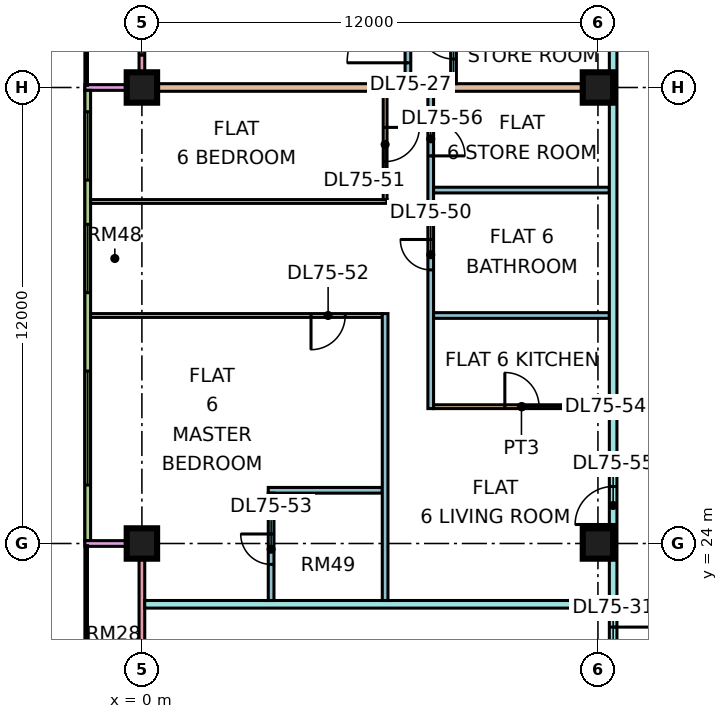
"""IFC4 building model, lengths in metres.
Left out: names, types, materials, properties, quantities, classifications, styles, units other than length and angle.
Written with IfcOpenShell. Run it as: python <this file> out.ifc"""

import sys

from ifc_helpers import new_model, si_unit, direction, frame, frame_2d, origin, origin_2d, place, context, subcontext, project, spatial, rectangle, extrude, element, fill, save


model = new_model("IFC4")
c1 = context("Model", 3, precision=1e-05, world=origin(), true_north=direction((0.0, 1.0)))
c2 = subcontext(c1, "Body", "Model", "MODEL_VIEW")
j1 = project(units=[si_unit("LENGTHUNIT", "METRE"), si_unit("PLANEANGLEUNIT", "RADIAN")], contexts=[c1])
p1 = place(None, origin())
s1 = spatial("IfcSite", under=j1, at=p1, CompositionType="ELEMENT")
p2 = place(p1, origin())
s2 = spatial("IfcBuilding", under=s1, at=p2, CompositionType="ELEMENT")
p3 = place(p2, frame((0.0, 0.0, 318.4)))
s3 = spatial("IfcBuildingStorey", under=s2, at=p3, CompositionType="ELEMENT", Elevation=318.4)
p4 = place(p3, frame((0.0, 24.0, 0.0), z_axis=(0.0, 0.0, 1.0), x_axis=(1.0, 0.0, 0.0)))
e1 = element("IfcColumn", 1, at=p4, inside=s3, PredefinedType="COLUMN", context=c2, shape_type="SweptSolid", body=[
    extrude(rectangle(XDim=0.8, YDim=0.8, at=origin_2d()), origin(), (0.0, 0.0, 1.0), 3.75),
])
p5 = place(p3, frame((0.0, 36.0, 0.0), z_axis=(0.0, 0.0, 1.0), x_axis=(1.0, 0.0, 0.0)))
e2 = element("IfcColumn", 2, at=p5, inside=s3, PredefinedType="COLUMN", context=c2, shape_type="SweptSolid", body=[
    extrude(rectangle(XDim=0.8, YDim=0.8, at=origin_2d()), origin(), (0.0, 0.0, 1.0), 3.75),
])
for number, where, z_axis, x_axis in (
    (3, (12.0, 24.0, 0.0), (0.0, 0.0, 1.0), (1.0, 0.0, 0.0)),
    (4, (12.0, 36.0, 0.0), (0.0, 0.0, 1.0), (1.0, 0.0, 0.0)),
):
    element("IfcColumn", number, at=place(p3, frame(where, z_axis=z_axis, x_axis=x_axis)), inside=s3, PredefinedType="COLUMN", context=c2, shape_type="SweptSolid", body=[
        extrude(rectangle(XDim=0.8, YDim=0.8, at=origin_2d()), origin(), (0.0, 0.0, 1.0), 3.75),
    ])
p6 = place(p3, frame((0.0, 47.925, 0.0), z_axis=(0.0, 0.0, 1.0), x_axis=(0.0, -1.0, 0.0)))
e5 = element("IfcWall", 5, at=p6, inside=s3, PredefinedType="SOLIDWALL", context=c2, shape_type="SweptSolid", body=[
    extrude(rectangle(XDim=11.85, YDim=0.15, at=frame_2d((5.925, 0.0))), origin(), (0.0, 0.0, 1.0), 3.3),
])
p7 = place(p6, frame((0.613, 0.0, 0.0)))
e6 = element("IfcOpeningElement", 6, at=p7, cuts=e5, PredefinedType="OPENING", context=c2, shape_type="SweptSolid", body=[
    extrude(rectangle(XDim=1.2, YDim=2.4, at=frame_2d((0.6, 1.2))), frame((0.0, 0.085, 0.0), z_axis=(0.0, -1.0, 0.0), x_axis=(1.0, 0.0, 0.0)), (0.0, 0.0, 1.0), 0.17),
])
p8 = place(p6, frame((4.675, 0.0, 0.45)))
e7 = element("IfcOpeningElement", 7, at=p8, cuts=e5, PredefinedType="OPENING", context=c2, shape_type="SweptSolid", body=[
    extrude(rectangle(XDim=3.0, YDim=2.4, at=frame_2d((1.5, 1.2))), frame((0.0, 0.085, 0.0), z_axis=(0.0, -1.0, 0.0), x_axis=(1.0, 0.0, 0.0)), (0.0, 0.0, 1.0), 0.17),
])
p9 = place(p6, frame((9.275, 0.0, 0.45)))
e8 = element("IfcOpeningElement", 8, at=p9, cuts=e5, PredefinedType="OPENING", context=c2, shape_type="SweptSolid", body=[
    extrude(rectangle(XDim=1.8, YDim=2.4, at=frame_2d((0.9, 1.2))), frame((0.0, 0.085, 0.0), z_axis=(0.0, -1.0, 0.0), x_axis=(1.0, 0.0, 0.0)), (0.0, 0.0, 1.0), 0.17),
])
p10 = place(p3, frame((-1.5, 36.0, 0.0), z_axis=(0.0, 0.0, 1.0), x_axis=(1.0, 0.0, 0.0)))
e9 = element("IfcWall", 9, at=p10, inside=s3, PredefinedType="SOLIDWALL", context=c2, shape_type="SweptSolid", body=[
    extrude(rectangle(XDim=1.5, YDim=0.15, at=frame_2d((0.75, 0.0))), origin(), (0.0, 0.0, 1.0), 3.3),
])
p11 = place(p3, frame((-1.425, 35.925, 0.0), z_axis=(0.0, 0.0, 1.0), x_axis=(0.0, -1.0, 0.0)))
e10 = element("IfcWall", 10, at=p11, inside=s3, PredefinedType="SOLIDWALL", context=c2, shape_type="SweptSolid", body=[
    extrude(rectangle(XDim=11.85, YDim=0.15, at=frame_2d((5.925, 0.0))), origin(), (0.0, 0.0, 1.0), 3.3),
])
p12 = place(p11, frame((0.562, 0.0, 0.45)))
e11 = element("IfcOpeningElement", 11, at=p12, cuts=e10, PredefinedType="OPENING", context=c2, shape_type="SweptSolid", body=[
    extrude(rectangle(XDim=1.8, YDim=2.4, at=frame_2d((0.9, 1.2))), frame((0.0, 0.085, 0.0), z_axis=(0.0, -1.0, 0.0), x_axis=(1.0, 0.0, 0.0)), (0.0, 0.0, 1.0), 0.17),
])
p13 = place(p11, frame((3.525, 0.0, 0.45)))
e12 = element("IfcOpeningElement", 12, at=p13, cuts=e10, PredefinedType="OPENING", context=c2, shape_type="SweptSolid", body=[
    extrude(rectangle(XDim=1.8, YDim=2.4, at=frame_2d((0.9, 1.2))), frame((0.0, 0.085, 0.0), z_axis=(0.0, -1.0, 0.0), x_axis=(1.0, 0.0, 0.0)), (0.0, 0.0, 1.0), 0.17),
])
p14 = place(p11, frame((7.387, 0.0, 0.45)))
e13 = element("IfcOpeningElement", 13, at=p14, cuts=e10, PredefinedType="OPENING", context=c2, shape_type="SweptSolid", body=[
    extrude(rectangle(XDim=3.0, YDim=2.4, at=frame_2d((1.5, 1.2))), frame((0.0, 0.085, 0.0), z_axis=(0.0, -1.0, 0.0), x_axis=(1.0, 0.0, 0.0)), (0.0, 0.0, 1.0), 0.17),
])
p15 = place(p3, frame((0.0, 23.925, 0.0), z_axis=(0.0, 0.0, 1.0), x_axis=(0.0, -1.0, 0.0)))
e14 = element("IfcWall", 14, at=p15, inside=s3, PredefinedType="SOLIDWALL", context=c2, shape_type="SweptSolid", body=[
    extrude(rectangle(XDim=11.35, YDim=0.15, at=frame_2d((5.675, 0.0))), origin(), (0.0, 0.0, 1.0), 3.3),
])
p16 = place(p15, frame((6.738, 0.0, 0.0)))
e15 = element("IfcOpeningElement", 15, at=p16, cuts=e14, PredefinedType="OPENING", context=c2, shape_type="SweptSolid", body=[
    extrude(rectangle(XDim=1.8, YDim=2.4, at=frame_2d((0.9, 1.2))), frame((0.0, 0.085, 0.0), z_axis=(0.0, -1.0, 0.0), x_axis=(1.0, 0.0, 0.0)), (0.0, 0.0, 1.0), 0.17),
])
p17 = place(p3, frame((-1.5, 24.0, 0.0), z_axis=(0.0, 0.0, 1.0), x_axis=(1.0, 0.0, 0.0)))
e16 = element("IfcWall", 16, at=p17, inside=s3, PredefinedType="SOLIDWALL", context=c2, shape_type="SweptSolid", body=[
    extrude(rectangle(XDim=1.5, YDim=0.15, at=frame_2d((0.75, 0.0))), origin(), (0.0, 0.0, 1.0), 3.3),
])
p18 = place(p3, frame((-1.35, 30.0, 0.0), z_axis=(0.0, 0.0, 1.0), x_axis=(1.0, 0.0, 0.0)))
e17 = element("IfcWall", 17, at=p18, inside=s3, PredefinedType="PARTITIONING", context=c2, shape_type="SweptSolid", body=[
    extrude(rectangle(XDim=7.675, YDim=0.1, at=frame_2d((3.837, 0.0))), origin(), (0.0, 0.0, 1.0), 3.3),
])
p19 = place(p18, frame((5.8, 0.0, 0.0)))
e18 = element("IfcOpeningElement", 18, at=p19, cuts=e17, PredefinedType="OPENING", context=c2, shape_type="SweptSolid", body=[
    extrude(rectangle(XDim=0.9, YDim=2.1, at=frame_2d((0.45, 1.05))), frame((0.0, 0.06, 0.0), z_axis=(0.0, -1.0, 0.0), x_axis=(1.0, 0.0, 0.0)), (0.0, 0.0, 1.0), 0.12),
])
p20 = place(p3, frame((-1.35, 33.0, 0.0), z_axis=(0.0, 0.0, 1.0), x_axis=(1.0, 0.0, 0.0)))
e19 = element("IfcWall", 19, at=p20, inside=s3, PredefinedType="PARTITIONING", context=c2, shape_type="SweptSolid", body=[
    extrude(rectangle(XDim=7.8, YDim=0.1, at=frame_2d((3.9, 0.0))), origin(), (0.0, 0.0, 1.0), 3.3),
])
e20 = element("IfcWall", 20, at=p5, inside=s3, PredefinedType="PARTITIONING", context=c2, shape_type="SweptSolid", body=[
    extrude(rectangle(XDim=12.3, YDim=0.2, at=frame_2d((6.15, 0.0))), origin(), (0.0, 0.0, 1.0), 3.3),
])
p21 = place(p3, frame((0.074, 22.4, 0.0), z_axis=(0.0, 0.0, 1.0), x_axis=(1.0, 0.0, 0.0)))
e21 = element("IfcWall", 21, at=p21, inside=s3, PredefinedType="PARTITIONING", context=c2, shape_type="SweptSolid", body=[
    extrude(rectangle(XDim=12.226, YDim=0.2, at=frame_2d((6.113, 0.0))), origin(), (0.0, 0.0, 1.0), 3.3),
])
p22 = place(p3, frame((3.325, 25.4, 0.0), z_axis=(0.0, 0.0, 1.0), x_axis=(1.0, 0.0, 0.0)))
e22 = element("IfcWall", 22, at=p22, inside=s3, PredefinedType="PARTITIONING", context=c2, shape_type="SweptSolid", body=[
    extrude(rectangle(XDim=3.0, YDim=0.15, at=frame_2d((1.5, 0.0))), origin(), (0.0, 0.0, 1.0), 3.3),
])
p23 = place(p3, frame((3.4, 22.5, 0.0), z_axis=(0.0, 0.0, 1.0), x_axis=(0.0, 1.0, 0.0)))
e23 = element("IfcWall", 23, at=p23, inside=s3, PredefinedType="PARTITIONING", context=c2, shape_type="SweptSolid", body=[
    extrude(rectangle(XDim=2.825, YDim=0.15, at=frame_2d((1.413, 0.0))), origin(), (0.0, 0.0, 1.0), 3.3),
])
p24 = place(p23, frame((0.95, 0.0, 0.0)))
e24 = element("IfcOpeningElement", 24, at=p24, cuts=e23, PredefinedType="OPENING", context=c2, shape_type="SweptSolid", body=[
    extrude(rectangle(XDim=0.8, YDim=2.1, at=frame_2d((0.4, 1.05))), frame((0.0, 0.085, 0.0), z_axis=(0.0, -1.0, 0.0), x_axis=(1.0, 0.0, 0.0)), (0.0, 0.0, 1.0), 0.17),
])
p25 = place(p3, frame((6.4, 22.5, 0.0), z_axis=(0.0, 0.0, 1.0), x_axis=(0.0, 1.0, 0.0)))
e25 = element("IfcWall", 25, at=p25, inside=s3, PredefinedType="PARTITIONING", context=c2, shape_type="SweptSolid", body=[
    extrude(rectangle(XDim=7.55, YDim=0.15, at=frame_2d((3.775, 0.0))), origin(), (0.0, 0.0, 1.0), 3.3),
])
p26 = place(p3, frame((6.4, 33.05, 0.0), z_axis=(0.0, 0.0, 1.0), x_axis=(0.0, 1.0, 0.0)))
e26 = element("IfcWall", 26, at=p26, inside=s3, PredefinedType="PARTITIONING", context=c2, shape_type="SweptSolid", body=[
    extrude(rectangle(XDim=2.85, YDim=0.1, at=frame_2d((1.425, 0.0))), origin(), (0.0, 0.0, 1.0), 3.3),
])
p27 = place(p26, frame((1.0, 0.0, 0.0)))
e27 = element("IfcOpeningElement", 27, at=p27, cuts=e26, PredefinedType="OPENING", context=c2, shape_type="SweptSolid", body=[
    extrude(rectangle(XDim=0.9, YDim=2.1, at=frame_2d((0.45, 1.05))), frame((0.0, 0.06, 0.0), z_axis=(0.0, -1.0, 0.0), x_axis=(1.0, 0.0, 0.0)), (0.0, 0.0, 1.0), 0.12),
])
p28 = place(p3, frame((7.0, 36.1, 0.0), z_axis=(0.0, 0.0, 1.0), x_axis=(0.0, 1.0, 0.0)))
e28 = element("IfcWall", 28, at=p28, inside=s3, PredefinedType="PARTITIONING", context=c2, shape_type="SweptSolid", body=[
    extrude(rectangle(XDim=8.95, YDim=0.15, at=frame_2d((4.475, 0.0))), origin(), (0.0, 0.0, 1.0), 3.3),
])
p29 = place(p28, frame((6.95, 0.0, 0.0)))
e29 = element("IfcOpeningElement", 29, at=p29, cuts=e28, PredefinedType="OPENING", context=c2, shape_type="SweptSolid", body=[
    extrude(rectangle(XDim=0.9, YDim=2.1, at=frame_2d((0.45, 1.05))), frame((0.0, 0.085, 0.0), z_axis=(0.0, -1.0, 0.0), x_axis=(1.0, 0.0, 0.0)), (0.0, 0.0, 1.0), 0.17),
])
p30 = place(p28, frame((0.55, 0.0, 0.0)))
e30 = element("IfcOpeningElement", 30, at=p30, cuts=e28, PredefinedType="OPENING", context=c2, shape_type="SweptSolid", body=[
    extrude(rectangle(XDim=1.6, YDim=2.1, at=frame_2d((0.8, 1.05))), frame((0.0, 0.085, 0.0), z_axis=(0.0, -1.0, 0.0), x_axis=(1.0, 0.0, 0.0)), (0.0, 0.0, 1.0), 0.17),
])
p31 = place(p3, frame((7.6, 27.55, 0.0), z_axis=(0.0, 0.0, 1.0), x_axis=(0.0, 1.0, 0.0)))
e31 = element("IfcWall", 31, at=p31, inside=s3, PredefinedType="PARTITIONING", context=c2, shape_type="SweptSolid", body=[
    extrude(rectangle(XDim=8.35, YDim=0.15, at=frame_2d((4.175, 0.0))), origin(), (0.0, 0.0, 1.0), 3.3),
])
p32 = place(p31, frame((3.65, 0.0, 0.0)))
e32 = element("IfcOpeningElement", 32, at=p32, cuts=e31, PredefinedType="OPENING", context=c2, shape_type="SweptSolid", body=[
    extrude(rectangle(XDim=0.8, YDim=2.1, at=frame_2d((0.4, 1.05))), frame((0.0, 0.085, 0.0), z_axis=(0.0, -1.0, 0.0), x_axis=(1.0, 0.0, 0.0)), (0.0, 0.0, 1.0), 0.17),
])
p33 = place(p31, frame((6.65, 0.0, 0.0)))
e33 = element("IfcOpeningElement", 33, at=p33, cuts=e31, PredefinedType="OPENING", context=c2, shape_type="SweptSolid", body=[
    extrude(rectangle(XDim=0.9, YDim=2.1, at=frame_2d((0.45, 1.05))), frame((0.0, 0.085, 0.0), z_axis=(0.0, -1.0, 0.0), x_axis=(1.0, 0.0, 0.0)), (0.0, 0.0, 1.0), 0.17),
])
p34 = place(p3, frame((7.675, 27.6, 0.0), z_axis=(0.0, 0.0, 1.0), x_axis=(1.0, 0.0, 0.0)))
e34 = element("IfcWall", 34, at=p34, inside=s3, PredefinedType="PARTITIONING", context=c2, shape_type="SweptSolid", body=[
    extrude(rectangle(XDim=4.625, YDim=0.1, at=frame_2d((2.312, 0.0))), origin(), (0.0, 0.0, 1.0), 3.3),
])
p35 = place(p34, frame((1.875, 0.0, 0.0)))
e35 = element("IfcOpeningElement", 35, at=p35, cuts=e34, PredefinedType="OPENING", context=c2, shape_type="SweptSolid", body=[
    extrude(rectangle(XDim=0.9, YDim=2.1, at=frame_2d((0.45, 1.05))), frame((0.0, 0.06, 0.0), z_axis=(0.0, -1.0, 0.0), x_axis=(1.0, 0.0, 0.0)), (0.0, 0.0, 1.0), 0.12),
])
for number, where, z_axis, x_axis in (
    (36, (7.675, 30.0, 0.0), (0.0, 0.0, 1.0), (1.0, 0.0, 0.0)),
    (37, (7.675, 33.3, 0.0), (0.0, 0.0, 1.0), (1.0, 0.0, 0.0)),
):
    element("IfcWall", number, at=place(p3, frame(where, z_axis=z_axis, x_axis=x_axis)), inside=s3, PredefinedType="PARTITIONING", context=c2, shape_type="SweptSolid", body=[
        extrude(rectangle(XDim=4.625, YDim=0.15, at=frame_2d((2.312, 0.0))), origin(), (0.0, 0.0, 1.0), 3.3),
    ])
p36 = place(p3, frame((8.2, 36.1, 0.0), z_axis=(0.0, 0.0, 1.0), x_axis=(0.0, 1.0, 0.0)))
e38 = element("IfcWall", 38, at=p36, inside=s3, PredefinedType="PARTITIONING", context=c2, shape_type="SweptSolid", body=[
    extrude(rectangle(XDim=14.65, YDim=0.15, at=frame_2d((7.325, 0.0))), origin(), (0.0, 0.0, 1.0), 3.3),
])
p37 = place(p36, frame((9.65, 0.0, 0.0)))
e39 = element("IfcOpeningElement", 39, at=p37, cuts=e38, PredefinedType="OPENING", context=c2, shape_type="SweptSolid", body=[
    extrude(rectangle(XDim=0.8, YDim=2.1, at=frame_2d((0.4, 1.05))), frame((0.0, 0.085, 0.0), z_axis=(0.0, -1.0, 0.0), x_axis=(1.0, 0.0, 0.0)), (0.0, 0.0, 1.0), 0.17),
])
p38 = place(p36, frame((5.15, 0.0, 0.0)))
e40 = element("IfcOpeningElement", 40, at=p38, cuts=e38, PredefinedType="OPENING", context=c2, shape_type="SweptSolid", body=[
    extrude(rectangle(XDim=0.9, YDim=2.1, at=frame_2d((0.45, 1.05))), frame((0.0, 0.085, 0.0), z_axis=(0.0, -1.0, 0.0), x_axis=(1.0, 0.0, 0.0)), (0.0, 0.0, 1.0), 0.17),
])
p39 = place(p36, frame((0.65, 0.0, 0.0)))
e41 = element("IfcOpeningElement", 41, at=p39, cuts=e38, PredefinedType="OPENING", context=c2, shape_type="SweptSolid", body=[
    extrude(rectangle(XDim=0.9, YDim=2.1, at=frame_2d((0.45, 1.05))), frame((0.0, 0.085, 0.0), z_axis=(0.0, -1.0, 0.0), x_axis=(1.0, 0.0, 0.0)), (0.0, 0.0, 1.0), 0.17),
])
p40 = place(p3, frame((12.4, 20.0, 0.0), z_axis=(0.0, 0.0, 1.0), x_axis=(0.0, 1.0, 0.0)))
e42 = element("IfcWall", 42, at=p40, inside=s3, PredefinedType="PARTITIONING", context=c2, shape_type="SweptSolid", body=[
    extrude(rectangle(XDim=33.926, YDim=0.2, at=frame_2d((16.963, 0.0))), origin(), (0.0, 0.0, 1.0), 3.3),
])
p41 = place(p40, frame((31.8, 0.0, 0.0)))
e43 = element("IfcOpeningElement", 43, at=p41, cuts=e42, PredefinedType="OPENING", context=c2, shape_type="SweptSolid", body=[
    extrude(rectangle(XDim=1.0, YDim=2.1, at=frame_2d((0.5, 1.05))), frame((0.0, 0.11, 0.0), z_axis=(0.0, -1.0, 0.0), x_axis=(1.0, 0.0, 0.0)), (0.0, 0.0, 1.0), 0.22),
])
p42 = place(p40, frame((0.6, 0.0, 0.0)))
e44 = element("IfcOpeningElement", 44, at=p42, cuts=e42, PredefinedType="OPENING", context=c2, shape_type="SweptSolid", body=[
    extrude(rectangle(XDim=1.2, YDim=2.1, at=frame_2d((0.6, 1.05))), frame((0.0, 0.11, 0.0), z_axis=(0.0, -1.0, 0.0), x_axis=(1.0, 0.0, 0.0)), (0.0, 0.0, 1.0), 0.22),
])
p43 = place(p40, frame((4.5, 0.0, 0.0)))
e45 = element("IfcOpeningElement", 45, at=p43, cuts=e42, PredefinedType="OPENING", context=c2, shape_type="SweptSolid", body=[
    extrude(rectangle(XDim=1.0, YDim=2.1, at=frame_2d((0.5, 1.05))), frame((0.0, 0.11, 0.0), z_axis=(0.0, -1.0, 0.0), x_axis=(1.0, 0.0, 0.0)), (0.0, 0.0, 1.0), 0.22),
])
p44 = place(p9, origin())
e46 = element("IfcWindow", 46, at=p44, inside=s3, PartitioningType="SINGLE_PANEL", PredefinedType="WINDOW", context=c2, shape_type="SweptSolid", body=[
    extrude(rectangle(XDim=1.8, YDim=2.4, at=frame_2d((0.9, 1.2))), frame((0.0, 0.03, 0.0), z_axis=(0.0, -1.0, 0.0), x_axis=(1.0, 0.0, 0.0)), (0.0, 0.0, 1.0), 0.06),
])
fill(e8, e46)
p45 = place(p12, origin())
e47 = element("IfcWindow", 47, at=p45, inside=s3, PartitioningType="SINGLE_PANEL", PredefinedType="WINDOW", context=c2, shape_type="SweptSolid", body=[
    extrude(rectangle(XDim=1.8, YDim=2.4, at=frame_2d((0.9, 1.2))), frame((0.0, 0.03, 0.0), z_axis=(0.0, -1.0, 0.0), x_axis=(1.0, 0.0, 0.0)), (0.0, 0.0, 1.0), 0.06),
])
fill(e11, e47)
p46 = place(p13, origin())
e48 = element("IfcWindow", 48, at=p46, inside=s3, PartitioningType="SINGLE_PANEL", PredefinedType="WINDOW", context=c2, shape_type="SweptSolid", body=[
    extrude(rectangle(XDim=1.8, YDim=2.4, at=frame_2d((0.9, 1.2))), frame((0.0, 0.03, 0.0), z_axis=(0.0, -1.0, 0.0), x_axis=(1.0, 0.0, 0.0)), (0.0, 0.0, 1.0), 0.06),
])
fill(e12, e48)
p47 = place(p14, origin())
e49 = element("IfcWindow", 49, at=p47, inside=s3, PartitioningType="SINGLE_PANEL", PredefinedType="WINDOW", context=c2, shape_type="SweptSolid", body=[
    extrude(rectangle(XDim=3.0, YDim=2.4, at=frame_2d((1.5, 1.2))), frame((0.0, 0.03, 0.0), z_axis=(0.0, -1.0, 0.0), x_axis=(1.0, 0.0, 0.0)), (0.0, 0.0, 1.0), 0.06),
])
fill(e13, e49)
p48 = place(p30, origin())
e50 = element("IfcDoor", 50, at=p48, inside=s3, OperationType="DOUBLE_DOOR_SINGLE_SWING", PredefinedType="DOOR", context=c2, shape_type="SweptSolid", body=[
    extrude(rectangle(XDim=1.6, YDim=2.1, at=frame_2d((0.8, 1.05))), frame((0.0, 0.025, 0.0), z_axis=(0.0, -1.0, 0.0), x_axis=(1.0, 0.0, 0.0)), (0.0, 0.0, 1.0), 0.05),
])
fill(e30, e50)
p49 = place(p39, frame((0.9, 0.0, 0.0), z_axis=(0.0, 0.0, 1.0), x_axis=(-1.0, 0.0, 0.0)))
e51 = element("IfcDoor", 51, at=p49, inside=s3, OperationType="SINGLE_SWING_RIGHT", PredefinedType="DOOR", context=c2, shape_type="SweptSolid", body=[
    extrude(rectangle(XDim=0.9, YDim=2.1, at=frame_2d((0.45, 1.05))), frame((0.0, 0.025, 0.0), z_axis=(0.0, -1.0, 0.0), x_axis=(1.0, 0.0, 0.0)), (0.0, 0.0, 1.0), 0.05),
])
fill(e41, e51)
p50 = place(p42, origin())
e52 = element("IfcDoor", 52, at=p50, inside=s3, OperationType="SINGLE_SWING_RIGHT", PredefinedType="DOOR", context=c2, shape_type="SweptSolid", body=[
    extrude(rectangle(XDim=1.2, YDim=2.1, at=frame_2d((0.6, 1.05))), frame((0.0, 0.025, 0.0), z_axis=(0.0, -1.0, 0.0), x_axis=(1.0, 0.0, 0.0)), (0.0, 0.0, 1.0), 0.05),
])
fill(e44, e52)
p51 = place(p32, frame((0.8, 0.0, 0.0), z_axis=(0.0, 0.0, 1.0), x_axis=(-1.0, 0.0, 0.0)))
e53 = element("IfcDoor", 53, at=p51, inside=s3, OperationType="SINGLE_SWING_RIGHT", PredefinedType="DOOR", context=c2, shape_type="SweptSolid", body=[
    extrude(rectangle(XDim=0.8, YDim=2.1, at=frame_2d((0.4, 1.05))), frame((0.0, 0.025, 0.0), z_axis=(0.0, -1.0, 0.0), x_axis=(1.0, 0.0, 0.0)), (0.0, 0.0, 1.0), 0.05),
])
fill(e32, e53)
p52 = place(p27, origin())
e54 = element("IfcDoor", 54, at=p52, inside=s3, OperationType="SINGLE_SWING_RIGHT", PredefinedType="DOOR", context=c2, shape_type="SweptSolid", body=[
    extrude(rectangle(XDim=0.9, YDim=2.1, at=frame_2d((0.45, 1.05))), frame((0.0, 0.025, 0.0), z_axis=(0.0, -1.0, 0.0), x_axis=(1.0, 0.0, 0.0)), (0.0, 0.0, 1.0), 0.05),
])
fill(e27, e54)
p53 = place(p19, frame((0.9, 0.0, 0.0), z_axis=(0.0, 0.0, 1.0), x_axis=(-1.0, 0.0, 0.0)))
e55 = element("IfcDoor", 55, at=p53, inside=s3, OperationType="SINGLE_SWING_LEFT", PredefinedType="DOOR", context=c2, shape_type="SweptSolid", body=[
    extrude(rectangle(XDim=0.9, YDim=2.1, at=frame_2d((0.45, 1.05))), frame((0.0, 0.025, 0.0), z_axis=(0.0, -1.0, 0.0), x_axis=(1.0, 0.0, 0.0)), (0.0, 0.0, 1.0), 0.05),
])
fill(e18, e55)
p54 = place(p24, frame((0.8, 0.0, 0.0), z_axis=(0.0, 0.0, 1.0), x_axis=(-1.0, 0.0, 0.0)))
e56 = element("IfcDoor", 56, at=p54, inside=s3, OperationType="SINGLE_SWING_RIGHT", PredefinedType="DOOR", context=c2, shape_type="SweptSolid", body=[
    extrude(rectangle(XDim=0.8, YDim=2.1, at=frame_2d((0.4, 1.05))), frame((0.0, 0.025, 0.0), z_axis=(0.0, -1.0, 0.0), x_axis=(1.0, 0.0, 0.0)), (0.0, 0.0, 1.0), 0.05),
])
fill(e24, e56)
p55 = place(p35, origin())
e57 = element("IfcDoor", 57, at=p55, inside=s3, OperationType="SINGLE_SWING_LEFT", PredefinedType="DOOR", context=c2, shape_type="SweptSolid", body=[
    extrude(rectangle(XDim=0.9, YDim=2.1, at=frame_2d((0.45, 1.05))), frame((0.0, 0.025, 0.0), z_axis=(0.0, -1.0, 0.0), x_axis=(1.0, 0.0, 0.0)), (0.0, 0.0, 1.0), 0.05),
])
fill(e35, e57)
p56 = place(p43, origin())
e58 = element("IfcDoor", 58, at=p56, inside=s3, OperationType="SINGLE_SWING_LEFT", PredefinedType="DOOR", context=c2, shape_type="SweptSolid", body=[
    extrude(rectangle(XDim=1.0, YDim=2.1, at=frame_2d((0.5, 1.05))), frame((0.0, 0.025, 0.0), z_axis=(0.0, -1.0, 0.0), x_axis=(1.0, 0.0, 0.0)), (0.0, 0.0, 1.0), 0.05),
])
fill(e45, e58)
p57 = place(p33, frame((0.9, 0.0, 0.0), z_axis=(0.0, 0.0, 1.0), x_axis=(-1.0, 0.0, 0.0)))
e59 = element("IfcDoor", 59, at=p57, inside=s3, OperationType="SINGLE_SWING_LEFT", PredefinedType="DOOR", context=c2, shape_type="SweptSolid", body=[
    extrude(rectangle(XDim=0.9, YDim=2.1, at=frame_2d((0.45, 1.05))), frame((0.0, 0.025, 0.0), z_axis=(0.0, -1.0, 0.0), x_axis=(1.0, 0.0, 0.0)), (0.0, 0.0, 1.0), 0.05),
])
fill(e33, e59)
save(model, sys.argv[1])
